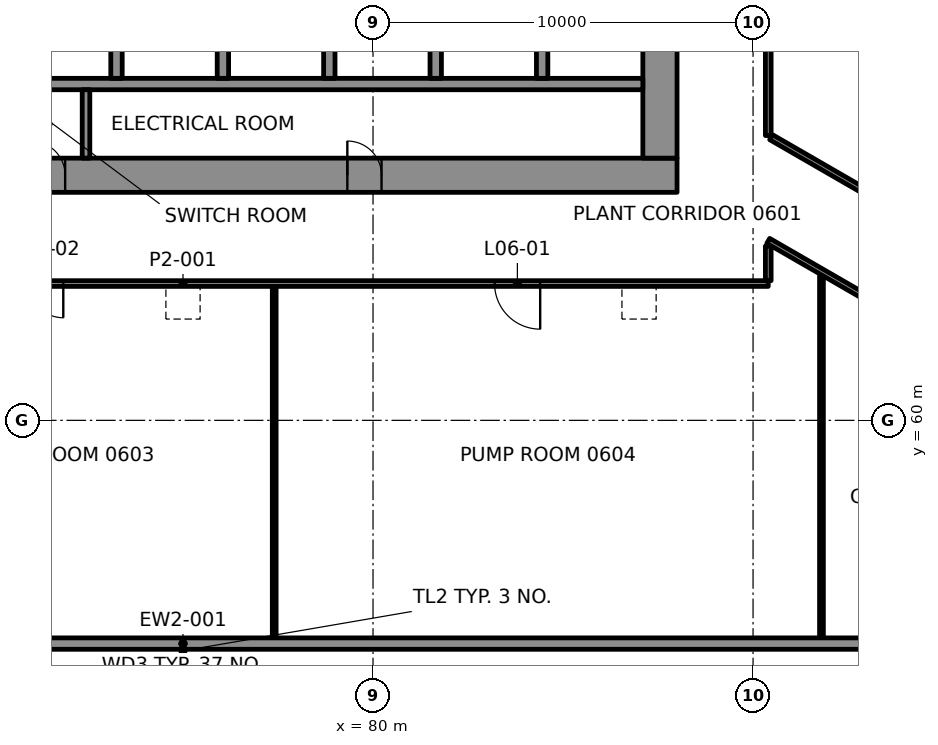
"""IFC4 building model, lengths in metres.
Left out: names, types, materials, properties, quantities, classifications, styles, units other than length and angle.
Written with IfcOpenShell. Run it as: python <this file> out.ifc"""

import sys

from ifc_helpers import new_model, si_unit, direction, frame, frame_2d, origin, place, context, subcontext, project, spatial, rectangle, extrude, element, fill, save


model = new_model("IFC4")
c1 = context("Model", 3, precision=1e-05, world=origin(), true_north=direction((0.0, 1.0)))
c2 = subcontext(c1, "Body", "Model", "MODEL_VIEW")
j1 = project(units=[si_unit("LENGTHUNIT", "METRE"), si_unit("PLANEANGLEUNIT", "RADIAN")], contexts=[c1])
p1 = place(None, origin())
s1 = spatial("IfcSite", under=j1, at=p1, CompositionType="ELEMENT")
p2 = place(p1, origin())
s2 = spatial("IfcBuilding", under=s1, at=p2, CompositionType="ELEMENT")
p3 = place(p2, frame((0.0, 0.0, 31.0)))
s3 = spatial("IfcBuildingStorey", under=s2, at=p3, CompositionType="ELEMENT", Elevation=31.0)
p4 = place(p3, frame((62.0, 66.45, 0.0), z_axis=(0.0, 0.0, 1.0), x_axis=(1.0, 0.0, 0.0)))
e1 = element("IfcWall", 1, at=p4, inside=s3, PredefinedType="SHEAR", context=c2, shape_type="SweptSolid", body=[
    extrude(rectangle(XDim=26.0, YDim=0.9, at=frame_2d((13.0, 0.0))), origin(), (0.0, 0.0, 1.0), 4.05),
])
p5 = place(p4, frame((3.45, 0.0, 0.0)))
e2 = element("IfcOpeningElement", 2, at=p5, cuts=e1, PredefinedType="OPENING", context=c2, shape_type="SweptSolid", body=[
    extrude(rectangle(XDim=0.9, YDim=2.1, at=frame_2d((0.45, 1.05))), frame((0.0, 0.46, 0.0), z_axis=(0.0, -1.0, 0.0), x_axis=(1.0, 0.0, 0.0)), (0.0, 0.0, 1.0), 0.92),
])
p6 = place(p4, frame((5.637, 0.0, 0.0)))
e3 = element("IfcOpeningElement", 3, at=p6, cuts=e1, PredefinedType="OPENING", context=c2, shape_type="SweptSolid", body=[
    extrude(rectangle(XDim=0.9, YDim=2.1, at=frame_2d((0.45, 1.05))), frame((0.0, 0.46, 0.0), z_axis=(0.0, -1.0, 0.0), x_axis=(1.0, 0.0, 0.0)), (0.0, 0.0, 1.0), 0.92),
])
p7 = place(p4, frame((7.212, 0.0, 0.0)))
e4 = element("IfcOpeningElement", 4, at=p7, cuts=e1, PredefinedType="OPENING", context=c2, shape_type="SweptSolid", body=[
    extrude(rectangle(XDim=0.9, YDim=2.1, at=frame_2d((0.45, 1.05))), frame((0.0, 0.46, 0.0), z_axis=(0.0, -1.0, 0.0), x_axis=(1.0, 0.0, 0.0)), (0.0, 0.0, 1.0), 0.92),
])
p8 = place(p4, frame((8.999, 0.0, 0.0)))
e5 = element("IfcOpeningElement", 5, at=p8, cuts=e1, PredefinedType="OPENING", context=c2, shape_type="SweptSolid", body=[
    extrude(rectangle(XDim=0.9, YDim=2.1, at=frame_2d((0.45, 1.05))), frame((0.0, 0.46, 0.0), z_axis=(0.0, -1.0, 0.0), x_axis=(1.0, 0.0, 0.0)), (0.0, 0.0, 1.0), 0.92),
])
p9 = place(p4, frame((17.324, 0.0, 0.0)))
e6 = element("IfcOpeningElement", 6, at=p9, cuts=e1, PredefinedType="OPENING", context=c2, shape_type="SweptSolid", body=[
    extrude(rectangle(XDim=0.9, YDim=2.1, at=frame_2d((0.45, 1.05))), frame((0.0, 0.46, 0.0), z_axis=(0.0, -1.0, 0.0), x_axis=(1.0, 0.0, 0.0)), (0.0, 0.0, 1.0), 0.92),
])
p10 = place(p3, frame((87.55, 66.9, 0.0), z_axis=(0.0, 0.0, 1.0), x_axis=(0.0, 1.0, 0.0)))
e7 = element("IfcWall", 7, at=p10, inside=s3, PredefinedType="SHEAR", context=c2, shape_type="SweptSolid", body=[
    extrude(rectangle(XDim=16.2, YDim=0.9, at=frame_2d((8.1, 0.0))), origin(), (0.0, 0.0, 1.0), 4.05),
])
p11 = place(p10, frame((5.5, 0.0, 0.0)))
e8 = element("IfcOpeningElement", 8, at=p11, cuts=e7, PredefinedType="OPENING", context=c2, shape_type="SweptSolid", body=[
    extrude(rectangle(XDim=1.8, YDim=2.1, at=frame_2d((0.9, 1.05))), frame((0.0, 0.46, 0.0), z_axis=(0.0, -1.0, 0.0), x_axis=(1.0, 0.0, 0.0)), (0.0, 0.0, 1.0), 0.92),
])
p12 = place(p10, frame((11.202, 0.0, 0.0)))
e9 = element("IfcOpeningElement", 9, at=p12, cuts=e7, PredefinedType="OPENING", context=c2, shape_type="SweptSolid", body=[
    extrude(rectangle(XDim=0.9, YDim=2.1, at=frame_2d((0.45, 1.05))), frame((0.0, 0.46, 0.0), z_axis=(0.0, -1.0, 0.0), x_axis=(1.0, 0.0, 0.0)), (0.0, 0.0, 1.0), 0.92),
])
p13 = place(p3, frame((70.35, 68.85, 0.0), z_axis=(0.0, 0.0, 1.0), x_axis=(1.0, 0.0, 0.0)))
e10 = element("IfcWall", 10, at=p13, inside=s3, PredefinedType="SHEAR", context=c2, shape_type="SweptSolid", body=[
    extrude(rectangle(XDim=16.75, YDim=0.3, at=frame_2d((8.375, 0.0))), origin(), (0.0, 0.0, 1.0), 4.05),
])
for number, where, z_axis, x_axis in (
    (11, (73.25, 69.0, 0.0), (0.0, 0.0, 1.0), (0.0, 1.0, 0.0)),
    (12, (76.05, 69.0, 0.0), (0.0, 0.0, 1.0), (0.0, 1.0, 0.0)),
    (13, (78.85, 69.0, 0.0), (0.0, 0.0, 1.0), (0.0, 1.0, 0.0)),
    (14, (81.65, 69.0, 0.0), (0.0, 0.0, 1.0), (0.0, 1.0, 0.0)),
    (15, (84.45, 69.0, 0.0), (0.0, 0.0, 1.0), (0.0, 1.0, 0.0)),
):
    element("IfcWall", number, at=place(p3, frame(where, z_axis=z_axis, x_axis=x_axis)), inside=s3, PredefinedType="SHEAR", context=c2, shape_type="SweptSolid", body=[
        extrude(rectangle(XDim=2.6, YDim=0.3, at=frame_2d((1.3, 0.0))), origin(), (0.0, 0.0, 1.0), 4.05),
    ])
p14 = place(p3, frame((90.4, 63.6, 0.0), z_axis=(0.0, 0.0, 1.0), x_axis=(-1.0, 0.0, 0.0)))
e16 = element("IfcWall", 16, at=p14, inside=s3, PredefinedType="PARTITIONING", context=c2, shape_type="SweptSolid", body=[
    extrude(rectangle(XDim=30.799, YDim=0.15, at=frame_2d((15.4, 0.0))), origin(), (0.0, 0.0, 1.0), 3.45),
])
p15 = place(p14, frame((6.001, 0.0, 0.0)))
e17 = element("IfcOpeningElement", 17, at=p15, cuts=e16, PredefinedType="OPENING", context=c2, shape_type="SweptSolid", body=[
    extrude(rectangle(XDim=1.2, YDim=2.1, at=frame_2d((0.6, 1.05))), frame((0.0, 0.085, 0.0), z_axis=(0.0, -1.0, 0.0), x_axis=(1.0, 0.0, 0.0)), (0.0, 0.0, 1.0), 0.17),
])
p16 = place(p14, frame((18.55, 0.0, 0.0)))
e18 = element("IfcOpeningElement", 18, at=p16, cuts=e16, PredefinedType="OPENING", context=c2, shape_type="SweptSolid", body=[
    extrude(rectangle(XDim=0.9, YDim=2.1, at=frame_2d((0.45, 1.05))), frame((0.0, 0.085, 0.0), z_axis=(0.0, -1.0, 0.0), x_axis=(1.0, 0.0, 0.0)), (0.0, 0.0, 1.0), 0.17),
])
p17 = place(p14, frame((27.198, 0.0, 0.0)))
e19 = element("IfcOpeningElement", 19, at=p17, cuts=e16, PredefinedType="OPENING", context=c2, shape_type="SweptSolid", body=[
    extrude(rectangle(XDim=1.2, YDim=2.1, at=frame_2d((0.6, 1.05))), frame((0.0, 0.085, 0.0), z_axis=(0.0, -1.0, 0.0), x_axis=(1.0, 0.0, 0.0)), (0.0, 0.0, 1.0), 0.17),
])
p18 = place(p3, frame((91.8, 54.155, 0.0), z_axis=(0.0, 0.0, 1.0), x_axis=(0.0, 1.0, 0.0)))
e20 = element("IfcWall", 20, at=p18, inside=s3, PredefinedType="PARTITIONING", context=c2, shape_type="SweptSolid", body=[
    extrude(rectangle(XDim=9.643, YDim=0.1, at=frame_2d((4.822, 0.0))), origin(), (0.0, 0.0, 1.0), 3.45),
])
p19 = place(p3, frame((90.4, 63.675, 0.0), z_axis=(0.0, 0.0, 1.0), x_axis=(0.0, 1.0, 0.0)))
e21 = element("IfcWall", 21, at=p19, inside=s3, PredefinedType="PARTITIONING", context=c2, shape_type="SweptSolid", body=[
    extrude(rectangle(XDim=0.912, YDim=0.15, at=frame_2d((0.456, 0.0))), origin(), (0.0, 0.0, 1.0), 3.45),
])
p20 = place(p3, frame((90.4, 86.399, 0.0), z_axis=(0.0, 0.0, 1.0), x_axis=(0.0, -1.0, 0.0)))
e22 = element("IfcWall", 22, at=p20, inside=s3, PredefinedType="PARTITIONING", context=c2, shape_type="SweptSolid", body=[
    extrude(rectangle(XDim=18.905, YDim=0.15, at=frame_2d((9.453, 0.0))), origin(), (0.0, 0.0, 1.0), 3.45),
])
p21 = place(p20, frame((10.005, 0.0, 0.0)))
e23 = element("IfcOpeningElement", 23, at=p21, cuts=e22, PredefinedType="OPENING", context=c2, shape_type="SweptSolid", body=[
    extrude(rectangle(XDim=1.2, YDim=2.1, at=frame_2d((0.6, 1.05))), frame((0.0, 0.085, 0.0), z_axis=(0.0, -1.0, 0.0), x_axis=(1.0, 0.0, 0.0)), (0.0, 0.0, 1.0), 0.17),
])
p22 = place(p3, frame((77.4, 54.155, 0.0), z_axis=(0.0, 0.0, 1.0), x_axis=(0.0, 1.0, 0.0)))
e24 = element("IfcWall", 24, at=p22, inside=s3, PredefinedType="PARTITIONING", context=c2, shape_type="SweptSolid", body=[
    extrude(rectangle(XDim=9.37, YDim=0.1, at=frame_2d((4.685, 0.0))), origin(), (0.0, 0.0, 1.0), 3.45),
])
p23 = place(p3, frame((90.475, 67.451, 0.0), z_axis=(0.0, 0.0, 1.0), x_axis=(0.866022484069, -0.500005057062, 0.0)))
e25 = element("IfcWall", 25, at=p23, inside=s3, PredefinedType="PARTITIONING", context=c2, shape_type="SweptSolid", body=[
    extrude(rectangle(XDim=14.657, YDim=0.15, at=frame_2d((7.329, 0.0))), origin(), (0.0, 0.0, 1.0), 3.45),
])
p24 = place(p23, frame((8.235, 0.0, 0.0)))
e26 = element("IfcOpeningElement", 26, at=p24, cuts=e25, PredefinedType="OPENING", context=c2, shape_type="SweptSolid", body=[
    extrude(rectangle(XDim=0.9, YDim=2.1, at=frame_2d((0.45, 1.05))), frame((0.0, 0.085, 0.0), z_axis=(0.0, -1.0, 0.0), x_axis=(1.0, 0.0, 0.0)), (0.0, 0.0, 1.0), 0.17),
])
p25 = place(p3, frame((101.969, 58.044, 0.0), z_axis=(0.0, 0.0, 1.0), x_axis=(-0.866027935033, 0.499995615723, 0.0)))
e27 = element("IfcWall", 27, at=p25, inside=s3, PredefinedType="PARTITIONING", context=c2, shape_type="SweptSolid", body=[
    extrude(rectangle(XDim=13.358, YDim=0.15, at=frame_2d((6.679, 0.0))), origin(), (0.0, 0.0, 1.0), 3.297),
])
p26 = place(p25, frame((5.522, 0.0, 0.0)))
e28 = element("IfcOpeningElement", 28, at=p26, cuts=e27, PredefinedType="OPENING", context=c2, shape_type="SweptSolid", body=[
    extrude(rectangle(XDim=0.9, YDim=2.1, at=frame_2d((0.45, 1.05))), frame((0.0, 0.085, 0.0), z_axis=(0.0, -1.0, 0.0), x_axis=(1.0, 0.0, 0.0)), (0.0, 0.0, 1.0), 0.17),
])
p27 = place(p3, frame((46.148, 54.125, 0.0), z_axis=(0.0, 0.0, 1.0), x_axis=(1.0, 0.0, 0.0)))
e29 = element("IfcWall", 29, at=p27, inside=s3, PredefinedType="SOLIDWALL", context=c2, shape_type="SweptSolid", body=[
    extrude(rectangle(XDim=57.704, YDim=0.3, at=frame_2d((28.852, 0.0))), origin(), (0.0, 0.0, 1.0), 4.05),
])
p28 = place(p27, frame((1.145, 0.0, 0.8)))
e30 = element("IfcOpeningElement", 30, at=p28, cuts=e29, PredefinedType="OPENING", context=c2, shape_type="SweptSolid", body=[
    extrude(rectangle(XDim=3.0, YDim=2.4, at=frame_2d((1.5, 1.2))), frame((0.0, 0.16, 0.0), z_axis=(0.0, -1.0, 0.0), x_axis=(1.0, 0.0, 0.0)), (0.0, 0.0, 1.0), 0.32),
])
p29 = place(p27, frame((5.435, 0.0, 0.8)))
e31 = element("IfcOpeningElement", 31, at=p29, cuts=e29, PredefinedType="OPENING", context=c2, shape_type="SweptSolid", body=[
    extrude(rectangle(XDim=3.0, YDim=2.4, at=frame_2d((1.5, 1.2))), frame((0.0, 0.16, 0.0), z_axis=(0.0, -1.0, 0.0), x_axis=(1.0, 0.0, 0.0)), (0.0, 0.0, 1.0), 0.32),
])
p30 = place(p27, frame((49.269, 0.0, 0.8)))
e32 = element("IfcOpeningElement", 32, at=p30, cuts=e29, PredefinedType="OPENING", context=c2, shape_type="SweptSolid", body=[
    extrude(rectangle(XDim=3.0, YDim=2.4, at=frame_2d((1.5, 1.2))), frame((0.0, 0.16, 0.0), z_axis=(0.0, -1.0, 0.0), x_axis=(1.0, 0.0, 0.0)), (0.0, 0.0, 1.0), 0.32),
])
p31 = place(p27, frame((53.559, 0.0, 0.8)))
e33 = element("IfcOpeningElement", 33, at=p31, cuts=e29, PredefinedType="OPENING", context=c2, shape_type="SweptSolid", body=[
    extrude(rectangle(XDim=3.0, YDim=2.4, at=frame_2d((1.5, 1.2))), frame((0.0, 0.16, 0.0), z_axis=(0.0, -1.0, 0.0), x_axis=(1.0, 0.0, 0.0)), (0.0, 0.0, 1.0), 0.32),
])
p32 = place(p3, frame((107.504, 60.451, 0.0), z_axis=(0.0, 0.0, 1.0), x_axis=(-0.500000550228, 0.86602508611, 0.0)))
e34 = element("IfcWall", 34, at=p32, inside=s3, PredefinedType="SOLIDWALL", context=c2, shape_type="SweptSolid", body=[
    extrude(rectangle(XDim=57.704, YDim=0.3, at=frame_2d((28.852, 0.0))), origin(), (0.0, 0.0, 1.0), 4.05),
])
p33 = place(p32, frame((0.89, 0.0, 0.8)))
e35 = element("IfcOpeningElement", 35, at=p33, cuts=e34, PredefinedType="OPENING", context=c2, shape_type="SweptSolid", body=[
    extrude(rectangle(XDim=3.0, YDim=2.4, at=frame_2d((1.5, 1.2))), frame((0.0, 0.16, 0.0), z_axis=(0.0, -1.0, 0.0), x_axis=(1.0, 0.0, 0.0)), (0.0, 0.0, 1.0), 0.32),
])
p34 = place(p32, frame((4.67, 0.0, 0.8)))
e36 = element("IfcOpeningElement", 36, at=p34, cuts=e34, PredefinedType="OPENING", context=c2, shape_type="SweptSolid", body=[
    extrude(rectangle(XDim=3.0, YDim=2.4, at=frame_2d((1.5, 1.2))), frame((0.0, 0.16, 0.0), z_axis=(0.0, -1.0, 0.0), x_axis=(1.0, 0.0, 0.0)), (0.0, 0.0, 1.0), 0.32),
])
p35 = place(p32, frame((8.451, 0.0, 0.8)))
e37 = element("IfcOpeningElement", 37, at=p35, cuts=e34, PredefinedType="OPENING", context=c2, shape_type="SweptSolid", body=[
    extrude(rectangle(XDim=3.0, YDim=2.4, at=frame_2d((1.5, 1.2))), frame((0.0, 0.16, 0.0), z_axis=(0.0, -1.0, 0.0), x_axis=(1.0, 0.0, 0.0)), (0.0, 0.0, 1.0), 0.32),
])
p36 = place(p32, frame((12.231, 0.0, 0.8)))
e38 = element("IfcOpeningElement", 38, at=p36, cuts=e34, PredefinedType="OPENING", context=c2, shape_type="SweptSolid", body=[
    extrude(rectangle(XDim=3.0, YDim=2.4, at=frame_2d((1.5, 1.2))), frame((0.0, 0.16, 0.0), z_axis=(0.0, -1.0, 0.0), x_axis=(1.0, 0.0, 0.0)), (0.0, 0.0, 1.0), 0.32),
])
p37 = place(p32, frame((16.011, 0.0, 0.8)))
e39 = element("IfcOpeningElement", 39, at=p37, cuts=e34, PredefinedType="OPENING", context=c2, shape_type="SweptSolid", body=[
    extrude(rectangle(XDim=3.0, YDim=2.4, at=frame_2d((1.5, 1.2))), frame((0.0, 0.16, 0.0), z_axis=(0.0, -1.0, 0.0), x_axis=(1.0, 0.0, 0.0)), (0.0, 0.0, 1.0), 0.32),
])
p38 = place(p32, frame((19.792, 0.0, 0.8)))
e40 = element("IfcOpeningElement", 40, at=p38, cuts=e34, PredefinedType="OPENING", context=c2, shape_type="SweptSolid", body=[
    extrude(rectangle(XDim=3.0, YDim=2.4, at=frame_2d((1.5, 1.2))), frame((0.0, 0.16, 0.0), z_axis=(0.0, -1.0, 0.0), x_axis=(1.0, 0.0, 0.0)), (0.0, 0.0, 1.0), 0.32),
])
p39 = place(p32, frame((23.572, 0.0, 0.8)))
e41 = element("IfcOpeningElement", 41, at=p39, cuts=e34, PredefinedType="OPENING", context=c2, shape_type="SweptSolid", body=[
    extrude(rectangle(XDim=3.0, YDim=2.4, at=frame_2d((1.5, 1.2))), frame((0.0, 0.16, 0.0), z_axis=(0.0, -1.0, 0.0), x_axis=(1.0, 0.0, 0.0)), (0.0, 0.0, 1.0), 0.32),
])
p40 = place(p32, frame((27.352, 0.0, 0.8)))
e42 = element("IfcOpeningElement", 42, at=p40, cuts=e34, PredefinedType="OPENING", context=c2, shape_type="SweptSolid", body=[
    extrude(rectangle(XDim=3.0, YDim=2.4, at=frame_2d((1.5, 1.2))), frame((0.0, 0.16, 0.0), z_axis=(0.0, -1.0, 0.0), x_axis=(1.0, 0.0, 0.0)), (0.0, 0.0, 1.0), 0.32),
])
p41 = place(p32, frame((31.132, 0.0, 0.8)))
e43 = element("IfcOpeningElement", 43, at=p41, cuts=e34, PredefinedType="OPENING", context=c2, shape_type="SweptSolid", body=[
    extrude(rectangle(XDim=3.0, YDim=2.4, at=frame_2d((1.5, 1.2))), frame((0.0, 0.16, 0.0), z_axis=(0.0, -1.0, 0.0), x_axis=(1.0, 0.0, 0.0)), (0.0, 0.0, 1.0), 0.32),
])
p42 = place(p32, frame((34.913, 0.0, 0.8)))
e44 = element("IfcOpeningElement", 44, at=p42, cuts=e34, PredefinedType="OPENING", context=c2, shape_type="SweptSolid", body=[
    extrude(rectangle(XDim=3.0, YDim=2.4, at=frame_2d((1.5, 1.2))), frame((0.0, 0.16, 0.0), z_axis=(0.0, -1.0, 0.0), x_axis=(1.0, 0.0, 0.0)), (0.0, 0.0, 1.0), 0.32),
])
p43 = place(p32, frame((38.693, 0.0, 0.8)))
e45 = element("IfcOpeningElement", 45, at=p43, cuts=e34, PredefinedType="OPENING", context=c2, shape_type="SweptSolid", body=[
    extrude(rectangle(XDim=3.0, YDim=2.4, at=frame_2d((1.5, 1.2))), frame((0.0, 0.16, 0.0), z_axis=(0.0, -1.0, 0.0), x_axis=(1.0, 0.0, 0.0)), (0.0, 0.0, 1.0), 0.32),
])
p44 = place(p32, frame((42.473, 0.0, 0.8)))
e46 = element("IfcOpeningElement", 46, at=p44, cuts=e34, PredefinedType="OPENING", context=c2, shape_type="SweptSolid", body=[
    extrude(rectangle(XDim=3.0, YDim=2.4, at=frame_2d((1.5, 1.2))), frame((0.0, 0.16, 0.0), z_axis=(0.0, -1.0, 0.0), x_axis=(1.0, 0.0, 0.0)), (0.0, 0.0, 1.0), 0.32),
])
p45 = place(p32, frame((46.253, 0.0, 0.8)))
e47 = element("IfcOpeningElement", 47, at=p45, cuts=e34, PredefinedType="OPENING", context=c2, shape_type="SweptSolid", body=[
    extrude(rectangle(XDim=3.0, YDim=2.4, at=frame_2d((1.5, 1.2))), frame((0.0, 0.16, 0.0), z_axis=(0.0, -1.0, 0.0), x_axis=(1.0, 0.0, 0.0)), (0.0, 0.0, 1.0), 0.32),
])
p46 = place(p32, frame((50.033, 0.0, 0.8)))
e48 = element("IfcOpeningElement", 48, at=p46, cuts=e34, PredefinedType="OPENING", context=c2, shape_type="SweptSolid", body=[
    extrude(rectangle(XDim=3.0, YDim=2.4, at=frame_2d((1.5, 1.2))), frame((0.0, 0.16, 0.0), z_axis=(0.0, -1.0, 0.0), x_axis=(1.0, 0.0, 0.0)), (0.0, 0.0, 1.0), 0.32),
])
p47 = place(p32, frame((53.814, 0.0, 0.8)))
e49 = element("IfcOpeningElement", 49, at=p47, cuts=e34, PredefinedType="OPENING", context=c2, shape_type="SweptSolid", body=[
    extrude(rectangle(XDim=3.0, YDim=2.4, at=frame_2d((1.5, 1.2))), frame((0.0, 0.16, 0.0), z_axis=(0.0, -1.0, 0.0), x_axis=(1.0, 0.0, 0.0)), (0.0, 0.0, 1.0), 0.32),
])
p48 = place(p3, frame((72.448, 66.9, 0.0), z_axis=(0.0, 0.0, 1.0), x_axis=(0.0, 1.0, 0.0)))
e50 = element("IfcWall", 50, at=p48, inside=s3, PredefinedType="PARTITIONING", context=c2, shape_type="SweptSolid", body=[
    extrude(rectangle(XDim=1.8, YDim=0.2, at=frame_2d((0.9, 0.0))), origin(), (0.0, 0.0, 1.0), 4.05),
])
p49 = place(p15, origin())
e51 = element("IfcDoor", 51, at=p49, inside=s3, OperationType="DOUBLE_DOOR_SINGLE_SWING", PredefinedType="DOOR", context=c2, shape_type="SweptSolid", body=[
    extrude(rectangle(XDim=1.2, YDim=2.1, at=frame_2d((0.6, 1.05))), frame((0.0, 0.025, 0.0), z_axis=(0.0, -1.0, 0.0), x_axis=(1.0, 0.0, 0.0)), (0.0, 0.0, 1.0), 0.05),
])
fill(e17, e51)
p50 = place(p16, origin())
e52 = element("IfcDoor", 52, at=p50, inside=s3, OperationType="SINGLE_SWING_LEFT", PredefinedType="DOOR", context=c2, shape_type="SweptSolid", body=[
    extrude(rectangle(XDim=0.9, YDim=2.1, at=frame_2d((0.45, 1.05))), frame((0.0, 0.025, 0.0), z_axis=(0.0, -1.0, 0.0), x_axis=(1.0, 0.0, 0.0)), (0.0, 0.0, 1.0), 0.05),
])
fill(e18, e52)
p51 = place(p8, origin())
e53 = element("IfcDoor", 53, at=p51, inside=s3, OperationType="SINGLE_SWING_RIGHT", PredefinedType="DOOR", context=c2, shape_type="SweptSolid", body=[
    extrude(rectangle(XDim=0.9, YDim=2.1, at=frame_2d((0.45, 1.05))), frame((0.0, 0.17, 0.0), z_axis=(0.0, -1.0, 0.0), x_axis=(1.0, 0.0, 0.0)), (0.0, 0.0, 1.0), 0.34),
])
fill(e5, e53)
p52 = place(p9, origin())
e54 = element("IfcDoor", 54, at=p52, inside=s3, OperationType="SINGLE_SWING_LEFT", PredefinedType="DOOR", context=c2, shape_type="SweptSolid", body=[
    extrude(rectangle(XDim=0.9, YDim=2.1, at=frame_2d((0.45, 1.05))), frame((0.0, 0.17, 0.0), z_axis=(0.0, -1.0, 0.0), x_axis=(1.0, 0.0, 0.0)), (0.0, 0.0, 1.0), 0.34),
])
fill(e6, e54)
save(model, sys.argv[1])
